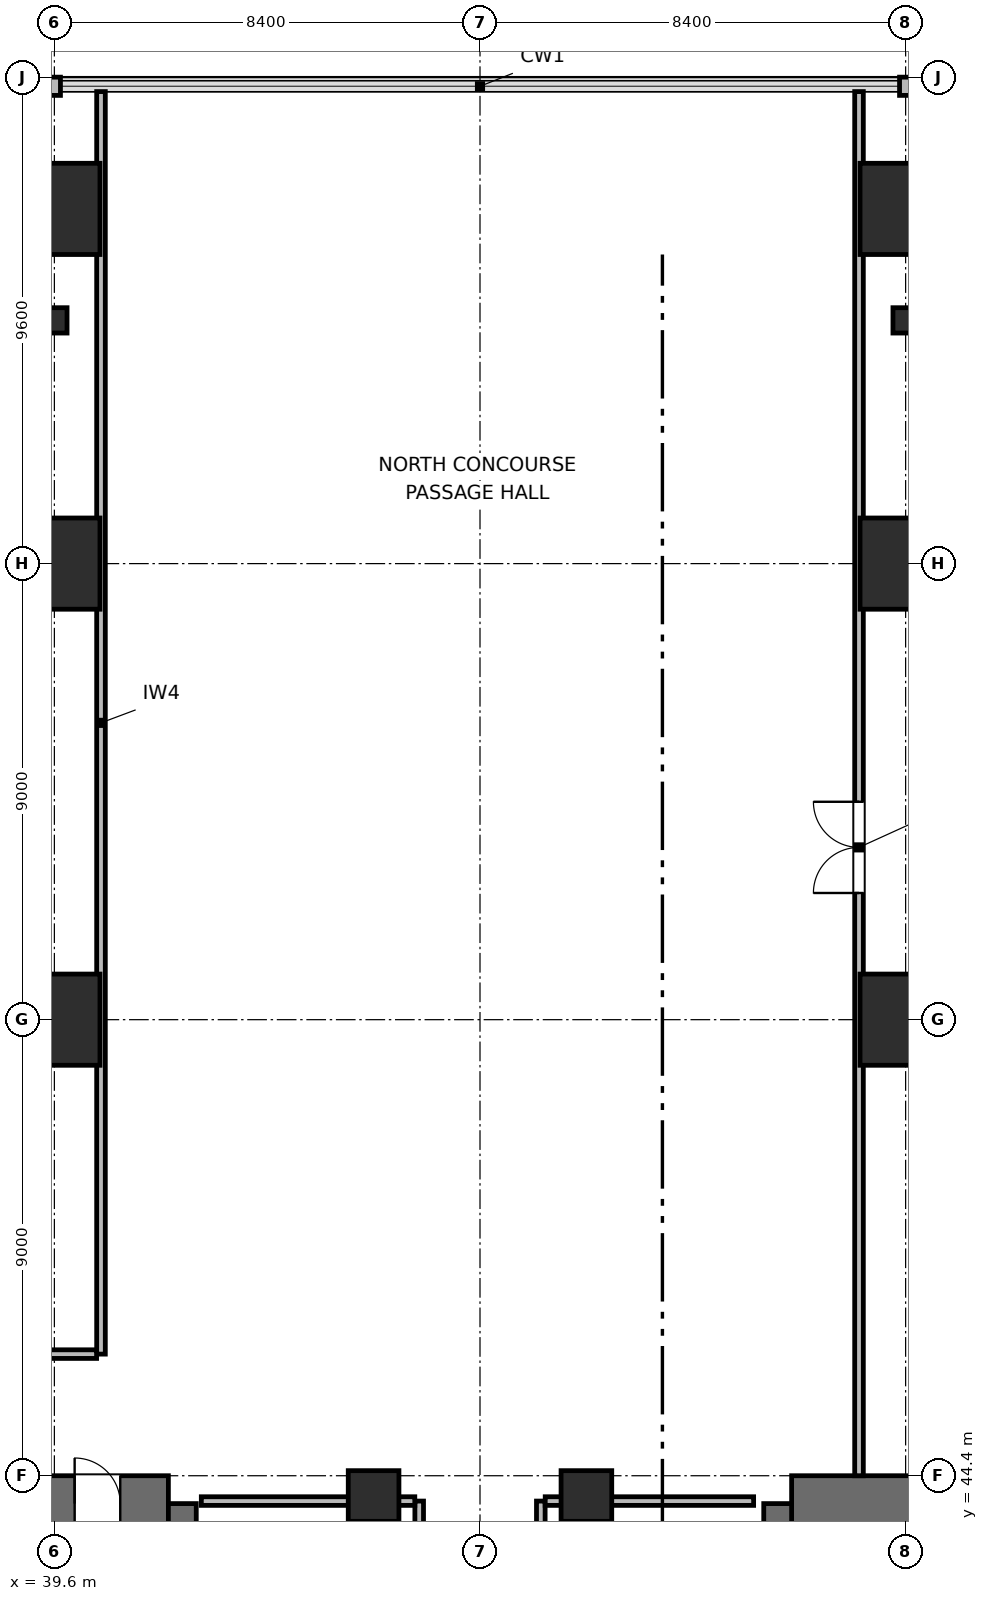
"""IFC4 building model, lengths in metres.
Left out: names, types, materials, properties, quantities, classifications, styles, units other than length and angle.
Written with IfcOpenShell. Run it as: python <this file> out.ifc"""

import sys

from ifc_helpers import new_model, si_unit, direction, frame, frame_2d, origin, origin_2d, place, context, subcontext, project, spatial, rectangle, hollow_rectangle, extrude, element, fill, save


model = new_model("IFC4")
c1 = context("Model", 3, precision=1e-05, world=origin(), true_north=direction((0.0, 1.0)))
c2 = subcontext(c1, "Body", "Model", "MODEL_VIEW")
j1 = project(units=[si_unit("LENGTHUNIT", "METRE"), si_unit("PLANEANGLEUNIT", "RADIAN")], contexts=[c1])
p1 = place(None, origin())
s1 = spatial("IfcSite", under=j1, at=p1, CompositionType="ELEMENT")
p2 = place(p1, origin())
s2 = spatial("IfcBuilding", under=s1, at=p2, CompositionType="ELEMENT")
p3 = place(p2, origin())
s3 = spatial("IfcBuildingStorey", under=s2, at=p3, CompositionType="ELEMENT", Elevation=0.0)
p4 = place(p3, frame((41.85, 37.8, 0.0), z_axis=(0.0, 0.0, 1.0), x_axis=(0.0, 1.0, 0.0)))
e1 = element("IfcWall", 1, at=p4, inside=s3, PredefinedType="SHEAR", context=c2, shape_type="SweptSolid", body=[
    extrude(rectangle(XDim=6.05, YDim=1.1, at=frame_2d((3.025, 0.0))), origin(), (0.0, 0.0, 1.0), 4.5),
])
p5 = place(p3, frame((32.95, 43.85, 0.0), z_axis=(0.0, 0.0, 1.0), x_axis=(1.0, 0.0, 0.0)))
e2 = element("IfcWall", 2, at=p5, inside=s3, PredefinedType="SHEAR", context=c2, shape_type="SweptSolid", body=[
    extrude(rectangle(XDim=8.9, YDim=1.1, at=frame_2d((4.45, 0.0))), origin(), (0.0, 0.0, 1.0), 4.5),
])
p6 = place(p5, frame((0.9, 0.0, 0.0)))
e3 = element("IfcOpeningElement", 3, at=p6, cuts=e2, PredefinedType="OPENING", context=c2, shape_type="SweptSolid", body=[
    extrude(rectangle(XDim=0.95, YDim=2.04, at=frame_2d((0.475, 1.02))), frame((0.0, 0.56, 0.0), z_axis=(0.0, -1.0, 0.0), x_axis=(1.0, 0.0, 0.0)), (0.0, 0.0, 1.0), 1.12),
])
p7 = place(p5, frame((4.15, 0.0, 0.0)))
e4 = element("IfcOpeningElement", 4, at=p7, cuts=e2, PredefinedType="OPENING", context=c2, shape_type="SweptSolid", body=[
    extrude(rectangle(XDim=0.9, YDim=2.02, at=frame_2d((0.45, 1.01))), frame((0.0, 0.56, 0.0), z_axis=(0.0, -1.0, 0.0), x_axis=(1.0, 0.0, 0.0)), (0.0, 0.0, 1.0), 1.12),
])
p8 = place(p5, frame((7.05, 0.0, 0.0)))
e5 = element("IfcOpeningElement", 5, at=p8, cuts=e2, PredefinedType="OPENING", context=c2, shape_type="SweptSolid", body=[
    extrude(rectangle(XDim=0.9, YDim=2.02, at=frame_2d((0.45, 1.01))), frame((0.0, 0.56, 0.0), z_axis=(0.0, -1.0, 0.0), x_axis=(1.0, 0.0, 0.0)), (0.0, 0.0, 1.0), 1.12),
])
p9 = place(p3, frame((54.15, 38.0, 0.0), z_axis=(0.0, 0.0, 1.0), x_axis=(0.0, 1.0, 0.0)))
e6 = element("IfcWall", 6, at=p9, inside=s3, PredefinedType="SHEAR", context=c2, shape_type="SweptSolid", body=[
    extrude(rectangle(XDim=5.85, YDim=1.1, at=frame_2d((2.925, 0.0))), origin(), (0.0, 0.0, 1.0), 4.5),
])
p10 = place(p3, frame((54.15, 43.85, 0.0), z_axis=(0.0, 0.0, 1.0), x_axis=(1.0, 0.0, 0.0)))
e7 = element("IfcWall", 7, at=p10, inside=s3, PredefinedType="SHEAR", context=c2, shape_type="SweptSolid", body=[
    extrude(rectangle(XDim=8.9, YDim=1.1, at=frame_2d((4.45, 0.0))), origin(), (0.0, 0.0, 1.0), 4.5),
])
for number, where, z_axis, x_axis in (
    (8, (39.6, 53.4, 0.0), (0.0, 0.0, 1.0), (1.0, 0.0, 0.0)),
    (9, (39.6, 62.4, 0.0), (0.0, 0.0, 1.0), (1.0, 0.0, 0.0)),
    (10, (39.6, 69.4, 0.0), (0.0, 0.0, 1.0), (1.0, 0.0, 0.0)),
    (11, (56.4, 53.4, 0.0), (0.0, 0.0, 1.0), (1.0, 0.0, 0.0)),
    (12, (56.4, 62.4, 0.0), (0.0, 0.0, 1.0), (1.0, 0.0, 0.0)),
    (13, (56.4, 69.4, 0.0), (0.0, 0.0, 1.0), (1.0, 0.0, 0.0)),
):
    element("IfcColumn", number, at=place(p3, frame(where, z_axis=z_axis, x_axis=x_axis)), inside=s3, PredefinedType="COLUMN", context=c2, shape_type="SweptSolid", body=[
        extrude(rectangle(XDim=1.8, YDim=1.8, at=origin_2d()), origin(), (0.0, 0.0, 1.0), 4.5),
    ])
for number, where, z_axis, x_axis in (
    (14, (45.9, 44.0, 0.0), (0.0, 0.0, 1.0), (1.0, 0.0, 0.0)),
    (15, (50.1, 44.0, 0.0), (0.0, 0.0, 1.0), (1.0, 0.0, 0.0)),
):
    element("IfcColumn", number, at=place(p3, frame(where, z_axis=z_axis, x_axis=x_axis)), inside=s3, PredefinedType="COLUMN", context=c2, shape_type="SweptSolid", body=[
        extrude(rectangle(XDim=1.0, YDim=1.0, at=origin_2d()), origin(), (0.0, 0.0, 1.0), 4.5),
    ])
for number, where, z_axis, x_axis in (
    (16, (39.6, 67.2, 0.0), (0.0, 0.0, 1.0), (1.0, 0.0, 0.0)),
    (17, (56.4, 67.2, 0.0), (0.0, 0.0, 1.0), (1.0, 0.0, 0.0)),
):
    element("IfcColumn", number, at=place(p3, frame(where, z_axis=z_axis, x_axis=x_axis)), inside=s3, PredefinedType="PILASTER", context=c2, shape_type="SweptSolid", body=[
        extrude(hollow_rectangle(XDim=0.5, YDim=0.5, WallThickness=0.025, at=origin_2d()), origin(), (0.0, 0.0, 1.0), 4.18),
    ])
p11 = place(p3, frame((0.0, 71.82, 0.0), z_axis=(0.0, 0.0, 1.0), x_axis=(1.0, 0.0, 0.0)))
e18 = element("IfcWall", 18, at=p11, inside=s3, PredefinedType="SOLIDWALL", context=c2, shape_type="SweptSolid", body=[
    extrude(rectangle(XDim=39.72, YDim=0.36, at=frame_2d((19.86, 0.0))), origin(), (0.0, 0.0, 1.0), 4.18),
])
p12 = place(p11, frame((13.0, 0.0, 0.7)))
e19 = element("IfcOpeningElement", 19, at=p12, cuts=e18, PredefinedType="OPENING", context=c2, shape_type="SweptSolid", body=[
    extrude(rectangle(XDim=3.0, YDim=1.8, at=frame_2d((1.5, 0.9))), frame((0.0, 0.19, 0.0), z_axis=(0.0, -1.0, 0.0), x_axis=(1.0, 0.0, 0.0)), (0.0, 0.0, 1.0), 0.38),
])
p13 = place(p11, frame((29.0, 0.0, 0.7)))
e20 = element("IfcOpeningElement", 20, at=p13, cuts=e18, PredefinedType="OPENING", context=c2, shape_type="SweptSolid", body=[
    extrude(rectangle(XDim=3.0, YDim=1.8, at=frame_2d((1.5, 0.9))), frame((0.0, 0.19, 0.0), z_axis=(0.0, -1.0, 0.0), x_axis=(1.0, 0.0, 0.0)), (0.0, 0.0, 1.0), 0.38),
])
p14 = place(p11, frame((2.2, 0.0, 0.0)))
e21 = element("IfcOpeningElement", 21, at=p14, cuts=e18, PredefinedType="OPENING", context=c2, shape_type="SweptSolid", body=[
    extrude(rectangle(XDim=6.0, YDim=2.8, at=frame_2d((3.0, 1.4))), frame((0.0, 0.19, 0.0), z_axis=(0.0, -1.0, 0.0), x_axis=(1.0, 0.0, 0.0)), (0.0, 0.0, 1.0), 0.38),
])
p15 = place(p11, frame((20.5, 0.0, 0.0)))
e22 = element("IfcOpeningElement", 22, at=p15, cuts=e18, PredefinedType="OPENING", context=c2, shape_type="SweptSolid", body=[
    extrude(rectangle(XDim=2.4, YDim=2.4, at=frame_2d((1.2, 1.2))), frame((0.0, 0.19, 0.0), z_axis=(0.0, -1.0, 0.0), x_axis=(1.0, 0.0, 0.0)), (0.0, 0.0, 1.0), 0.38),
])
p16 = place(p3, frame((56.28, 71.82, 0.0), z_axis=(0.0, 0.0, 1.0), x_axis=(1.0, 0.0, 0.0)))
e23 = element("IfcWall", 23, at=p16, inside=s3, PredefinedType="SOLIDWALL", context=c2, shape_type="SweptSolid", body=[
    extrude(rectangle(XDim=39.72, YDim=0.36, at=frame_2d((19.86, 0.0))), origin(), (0.0, 0.0, 1.0), 4.18),
])
p17 = place(p16, frame((6.5, 0.0, 0.7)))
e24 = element("IfcOpeningElement", 24, at=p17, cuts=e23, PredefinedType="OPENING", context=c2, shape_type="SweptSolid", body=[
    extrude(rectangle(XDim=3.0, YDim=1.8, at=frame_2d((1.5, 0.9))), frame((0.0, 0.19, 0.0), z_axis=(0.0, -1.0, 0.0), x_axis=(1.0, 0.0, 0.0)), (0.0, 0.0, 1.0), 0.38),
])
p18 = place(p16, frame((29.0, 0.0, 0.7)))
e25 = element("IfcOpeningElement", 25, at=p18, cuts=e23, PredefinedType="OPENING", context=c2, shape_type="SweptSolid", body=[
    extrude(rectangle(XDim=3.0, YDim=1.8, at=frame_2d((1.5, 0.9))), frame((0.0, 0.19, 0.0), z_axis=(0.0, -1.0, 0.0), x_axis=(1.0, 0.0, 0.0)), (0.0, 0.0, 1.0), 0.38),
])
p19 = place(p3, frame((46.8, 37.9, 0.0), z_axis=(0.0, 0.0, 1.0), x_axis=(0.0, 1.0, 0.0)))
e26 = element("IfcWall", 26, at=p19, inside=s3, PredefinedType="PARTITIONING", context=c2, shape_type="SweptSolid", body=[
    extrude(rectangle(XDim=6.0, YDim=0.17, at=frame_2d((3.0, 0.0))), origin(), (0.0, 0.0, 1.0), 4.18),
])
p20 = place(p19, frame((2.55, 0.0, 0.0)))
e27 = element("IfcOpeningElement", 27, at=p20, cuts=e26, PredefinedType="OPENING", context=c2, shape_type="SweptSolid", body=[
    extrude(rectangle(XDim=0.9, YDim=2.02, at=frame_2d((0.45, 1.01))), frame((0.0, 0.095, 0.0), z_axis=(0.0, -1.0, 0.0), x_axis=(1.0, 0.0, 0.0)), (0.0, 0.0, 1.0), 0.19),
])
p21 = place(p3, frame((42.5, 43.9, 0.0), z_axis=(0.0, 0.0, 1.0), x_axis=(1.0, 0.0, 0.0)))
e28 = element("IfcWall", 28, at=p21, inside=s3, PredefinedType="PARTITIONING", context=c2, shape_type="SweptSolid", body=[
    extrude(rectangle(XDim=4.213, YDim=0.17, at=frame_2d((2.106, 0.0))), origin(), (0.0, 0.0, 1.0), 3.065),
])
p22 = place(p3, frame((49.2, 37.9, 0.0), z_axis=(0.0, 0.0, 1.0), x_axis=(0.0, 1.0, 0.0)))
e29 = element("IfcWall", 29, at=p22, inside=s3, PredefinedType="PARTITIONING", context=c2, shape_type="SweptSolid", body=[
    extrude(rectangle(XDim=6.0, YDim=0.17, at=frame_2d((3.0, 0.0))), origin(), (0.0, 0.0, 1.0), 4.18),
])
p23 = place(p22, frame((1.47, 0.0, 0.0)))
e30 = element("IfcOpeningElement", 30, at=p23, cuts=e29, PredefinedType="OPENING", context=c2, shape_type="SweptSolid", body=[
    extrude(rectangle(XDim=0.9, YDim=2.02, at=frame_2d((0.45, 1.01))), frame((0.0, 0.095, 0.0), z_axis=(0.0, -1.0, 0.0), x_axis=(1.0, 0.0, 0.0)), (0.0, 0.0, 1.0), 0.19),
])
p24 = place(p22, frame((4.47, 0.0, 0.0)))
e31 = element("IfcOpeningElement", 31, at=p24, cuts=e29, PredefinedType="OPENING", context=c2, shape_type="SweptSolid", body=[
    extrude(rectangle(XDim=0.9, YDim=2.02, at=frame_2d((0.45, 1.01))), frame((0.0, 0.095, 0.0), z_axis=(0.0, -1.0, 0.0), x_axis=(1.0, 0.0, 0.0)), (0.0, 0.0, 1.0), 0.19),
])
p25 = place(p3, frame((49.287, 43.9, 0.0), z_axis=(0.0, 0.0, 1.0), x_axis=(1.0, 0.0, 0.0)))
e32 = element("IfcWall", 32, at=p25, inside=s3, PredefinedType="PARTITIONING", context=c2, shape_type="SweptSolid", body=[
    extrude(rectangle(XDim=4.113, YDim=0.17, at=frame_2d((2.056, 0.0))), origin(), (0.0, 0.0, 1.0), 3.065),
])
p26 = place(p3, frame((40.52, 46.8, 0.0), z_axis=(0.0, 0.0, 1.0), x_axis=(0.0, 1.0, 0.0)))
e33 = element("IfcWall", 33, at=p26, inside=s3, PredefinedType="PARTITIONING", context=c2, shape_type="SweptSolid", body=[
    extrude(rectangle(XDim=24.915, YDim=0.17, at=frame_2d((12.458, 0.0))), origin(), (0.0, 0.0, 1.0), 4.18),
])
p27 = place(p3, frame((55.48, 44.4, 0.0), z_axis=(0.0, 0.0, 1.0), x_axis=(0.0, 1.0, 0.0)))
e34 = element("IfcWall", 34, at=p27, inside=s3, PredefinedType="PARTITIONING", context=c2, shape_type="SweptSolid", body=[
    extrude(rectangle(XDim=27.315, YDim=0.17, at=frame_2d((13.658, 0.0))), origin(), (0.0, 0.0, 1.0), 4.18),
])
p28 = place(p27, frame((11.5, 0.0, 0.0)))
e35 = element("IfcOpeningElement", 35, at=p28, cuts=e34, PredefinedType="OPENING", context=c2, shape_type="SweptSolid", body=[
    extrude(rectangle(XDim=1.8, YDim=2.06, at=frame_2d((0.9, 1.03))), frame((0.0, 0.095, 0.0), z_axis=(0.0, -1.0, 0.0), x_axis=(1.0, 0.0, 0.0)), (0.0, 0.0, 1.0), 0.19),
])
p29 = place(p3, frame((25.4, 46.8, 0.0), z_axis=(0.0, 0.0, 1.0), x_axis=(1.0, 0.0, 0.0)))
e36 = element("IfcWall", 36, at=p29, inside=s3, PredefinedType="PARTITIONING", context=c2, shape_type="SweptSolid", body=[
    extrude(rectangle(XDim=15.033, YDim=0.17, at=frame_2d((7.517, 0.0))), origin(), (0.0, 0.0, 1.0), 4.18),
])
p30 = place(p29, frame((9.5, 0.0, 0.0)))
e37 = element("IfcOpeningElement", 37, at=p30, cuts=e36, PredefinedType="OPENING", context=c2, shape_type="SweptSolid", body=[
    extrude(rectangle(XDim=0.95, YDim=2.04, at=frame_2d((0.475, 1.02))), frame((0.0, 0.095, 0.0), z_axis=(0.0, -1.0, 0.0), x_axis=(1.0, 0.0, 0.0)), (0.0, 0.0, 1.0), 0.19),
])
p31 = place(p8, origin())
e38 = element("IfcDoor", 38, at=p31, inside=s3, OperationType="SINGLE_SWING_LEFT", PredefinedType="DOOR", context=c2, shape_type="SweptSolid", body=[
    extrude(rectangle(XDim=0.9, YDim=2.02, at=frame_2d((0.45, 1.01))), frame((0.0, 0.025, 0.0), z_axis=(0.0, -1.0, 0.0), x_axis=(1.0, 0.0, 0.0)), (0.0, 0.0, 1.0), 0.05),
])
fill(e5, e38)
p32 = place(p28, origin())
e39 = element("IfcDoor", 39, at=p32, inside=s3, OperationType="DOUBLE_DOOR_SINGLE_SWING", PredefinedType="DOOR", context=c2, shape_type="SweptSolid", body=[
    extrude(rectangle(XDim=1.8, YDim=2.06, at=frame_2d((0.9, 1.03))), frame((0.0, 0.025, 0.0), z_axis=(0.0, -1.0, 0.0), x_axis=(1.0, 0.0, 0.0)), (0.0, 0.0, 1.0), 0.05),
])
fill(e35, e39)
save(model, sys.argv[1])
